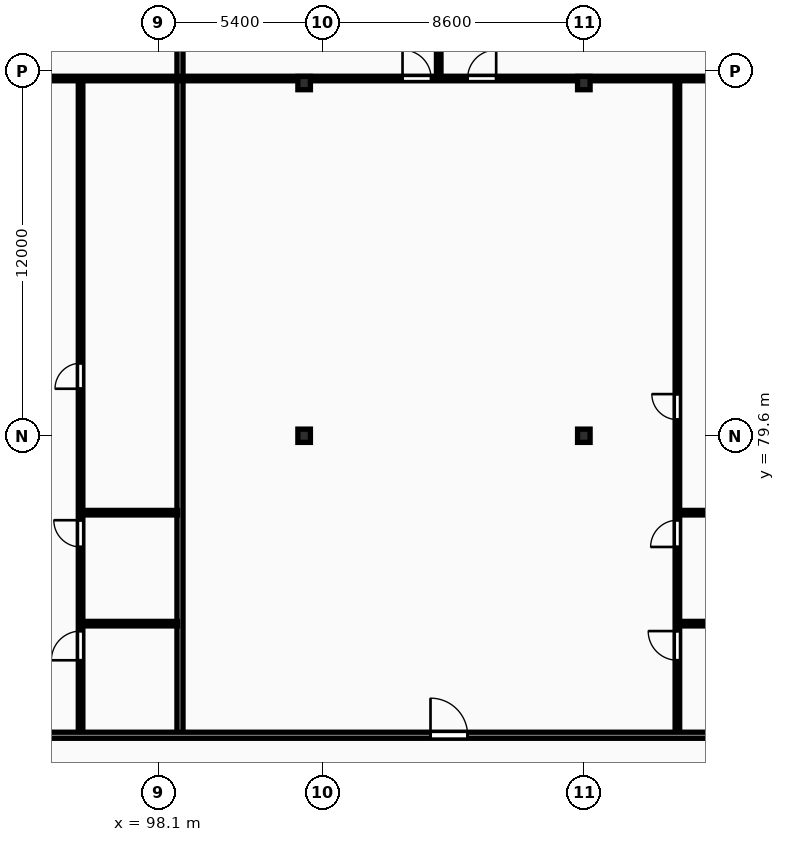
"""IFC4 building model, lengths in metres.
Left out: names, types, materials, properties, quantities, classifications, styles, units other than length and angle.
Written with IfcOpenShell. Run it as: python <this file> out.ifc"""

import sys

from ifc_helpers import new_model, si_unit, direction, frame, frame_2d, origin, origin_2d, place, context, subcontext, project, spatial, rectangle, i_section, extrude, element, fill, save


model = new_model("IFC4")
c1 = context("Model", 3, precision=1e-05, world=origin(), true_north=direction((0.0, 1.0)))
c2 = subcontext(c1, "Body", "Model", "MODEL_VIEW")
j1 = project(units=[si_unit("LENGTHUNIT", "METRE"), si_unit("PLANEANGLEUNIT", "RADIAN")], contexts=[c1])
p1 = place(None, origin())
s1 = spatial("IfcSite", under=j1, at=p1, CompositionType="ELEMENT")
p2 = place(p1, origin())
s2 = spatial("IfcBuilding", under=s1, at=p2, CompositionType="ELEMENT")
p3 = place(p2, frame((0.0, 0.0, 150.1)))
s3 = spatial("IfcBuildingStorey", under=s2, at=p3, CompositionType="ELEMENT", Elevation=150.1)
for number, where, z_axis, x_axis in (
    (1, (102.9, 79.6, 0.0), (0.0, 0.0, 1.0), (1.0, 0.0, 0.0)),
    (2, (102.9, 91.2, 0.0), (0.0, 0.0, 1.0), (1.0, 0.0, 0.0)),
    (3, (112.1, 79.6, 0.0), (0.0, 0.0, 1.0), (1.0, 0.0, 0.0)),
    (4, (112.1, 91.2, 0.0), (0.0, 0.0, 1.0), (1.0, 0.0, 0.0)),
):
    element("IfcColumn", number, at=place(p3, frame(where, z_axis=z_axis, x_axis=x_axis)), inside=s3, PredefinedType="COLUMN", context=c2, shape_type="SweptSolid", body=[
        extrude(i_section(OverallWidth=0.412, OverallDepth=0.437, WebThickness=0.036, FlangeThickness=0.052, FilletRadius=0.015, at=origin_2d()), origin(), (0.0, 0.0, 1.0), 3.6),
    ])
p4 = place(p3, frame((98.816, 69.83, 0.0), z_axis=(0.0, 0.0, 1.0), x_axis=(0.0, 1.0, 0.0)))
e5 = element("IfcWall", 5, at=p4, inside=s3, PredefinedType="PARTITIONING", context=c2, shape_type="SweptSolid", body=[
    extrude(rectangle(XDim=26.07, YDim=0.2, at=frame_2d((13.035, 0.0))), origin(), (0.0, 0.0, 1.0), 3.31),
])
for number, where, z_axis, x_axis in (
    (6, (95.606, 73.42, 0.0), (0.0, 0.0, 1.0), (1.0, 0.0, 0.0)),
    (7, (95.606, 77.07, 0.0), (0.0, 0.0, 1.0), (1.0, 0.0, 0.0)),
):
    element("IfcWall", number, at=place(p3, frame(where, z_axis=z_axis, x_axis=x_axis)), inside=s3, PredefinedType="PARTITIONING", context=c2, shape_type="SweptSolid", body=[
        extrude(rectangle(XDim=3.13, YDim=0.15, at=frame_2d((1.565, 0.0))), origin(), (0.0, 0.0, 1.0), 3.31),
    ])
p5 = place(p3, frame((95.546, 69.81, 0.0), z_axis=(0.0, 0.0, 1.0), x_axis=(0.0, 1.0, 0.0)))
e8 = element("IfcWall", 8, at=p5, inside=s3, PredefinedType="PARTITIONING", context=c2, shape_type="SweptSolid", body=[
    extrude(rectangle(XDim=21.48, YDim=0.15, at=frame_2d((10.74, 0.0))), origin(), (0.0, 0.0, 1.0), 3.31),
])
p6 = place(p5, frame((2.406, 0.0, 0.0)))
e9 = element("IfcOpeningElement", 9, at=p6, cuts=e8, PredefinedType="OPENING", context=c2, shape_type="SweptSolid", body=[
    extrude(rectangle(XDim=0.96, YDim=2.1, at=frame_2d((0.48, 1.05))), frame((0.0, 0.085, 0.0), z_axis=(0.0, -1.0, 0.0), x_axis=(1.0, 0.0, 0.0)), (0.0, 0.0, 1.0), 0.17),
])
p7 = place(p5, frame((6.133, 0.0, 0.0)))
e10 = element("IfcOpeningElement", 10, at=p7, cuts=e8, PredefinedType="OPENING", context=c2, shape_type="SweptSolid", body=[
    extrude(rectangle(XDim=0.88, YDim=2.06, at=frame_2d((0.44, 1.03))), frame((0.0, 0.085, 0.0), z_axis=(0.0, -1.0, 0.0), x_axis=(1.0, 0.0, 0.0)), (0.0, 0.0, 1.0), 0.17),
])
p8 = place(p5, frame((11.336, 0.0, 0.0)))
e11 = element("IfcOpeningElement", 11, at=p8, cuts=e8, PredefinedType="OPENING", context=c2, shape_type="SweptSolid", body=[
    extrude(rectangle(XDim=0.84, YDim=2.04, at=frame_2d((0.42, 1.02))), frame((0.0, 0.085, 0.0), z_axis=(0.0, -1.0, 0.0), x_axis=(1.0, 0.0, 0.0)), (0.0, 0.0, 1.0), 0.17),
])
p9 = place(p3, frame((79.437, 91.35, 0.0), z_axis=(0.0, 0.0, 1.0), x_axis=(1.0, 0.0, 0.0)))
e12 = element("IfcWall", 12, at=p9, inside=s3, PredefinedType="PARTITIONING", context=c2, shape_type="SweptSolid", body=[
    extrude(rectangle(XDim=19.299, YDim=0.15, at=frame_2d((9.649, 0.0))), origin(), (0.0, 0.0, 1.0), 3.003),
])
p10 = place(p9, frame((7.155, 0.0, 0.0)))
e13 = element("IfcOpeningElement", 13, at=p10, cuts=e12, PredefinedType="OPENING", context=c2, shape_type="SweptSolid", body=[
    extrude(rectangle(XDim=0.94, YDim=2.1, at=frame_2d((0.47, 1.05))), frame((0.0, 0.085, 0.0), z_axis=(0.0, -1.0, 0.0), x_axis=(1.0, 0.0, 0.0)), (0.0, 0.0, 1.0), 0.17),
])
p11 = place(p9, frame((9.179, 0.0, 0.0)))
e14 = element("IfcOpeningElement", 14, at=p11, cuts=e12, PredefinedType="OPENING", context=c2, shape_type="SweptSolid", body=[
    extrude(rectangle(XDim=0.94, YDim=2.1, at=frame_2d((0.47, 1.05))), frame((0.0, 0.085, 0.0), z_axis=(0.0, -1.0, 0.0), x_axis=(1.0, 0.0, 0.0)), (0.0, 0.0, 1.0), 0.17),
])
for number, where, z_axis, x_axis in (
    (15, (115.237, 73.42, 0.0), (0.0, 0.0, 1.0), (1.0, 0.0, 0.0)),
    (16, (115.237, 77.07, 0.0), (0.0, 0.0, 1.0), (1.0, 0.0, 0.0)),
):
    element("IfcWall", number, at=place(p3, frame(where, z_axis=z_axis, x_axis=x_axis)), inside=s3, PredefinedType="PARTITIONING", context=c2, shape_type="SweptSolid", body=[
        extrude(rectangle(XDim=3.36, YDim=0.15, at=frame_2d((1.68, 0.0))), origin(), (0.0, 0.0, 1.0), 3.31),
    ])
p12 = place(p3, frame((115.177, 69.81, 0.0), z_axis=(0.0, 0.0, 1.0), x_axis=(0.0, 1.0, 0.0)))
e17 = element("IfcWall", 17, at=p12, inside=s3, PredefinedType="PARTITIONING", context=c2, shape_type="SweptSolid", body=[
    extrude(rectangle(XDim=21.48, YDim=0.15, at=frame_2d((10.74, 0.0))), origin(), (0.0, 0.0, 1.0), 3.31),
])
p13 = place(p12, frame((2.406, 0.0, 0.0)))
e18 = element("IfcOpeningElement", 18, at=p13, cuts=e17, PredefinedType="OPENING", context=c2, shape_type="SweptSolid", body=[
    extrude(rectangle(XDim=0.96, YDim=2.1, at=frame_2d((0.48, 1.05))), frame((0.0, 0.085, 0.0), z_axis=(0.0, -1.0, 0.0), x_axis=(1.0, 0.0, 0.0)), (0.0, 0.0, 1.0), 0.17),
])
p14 = place(p12, frame((6.133, 0.0, 0.0)))
e19 = element("IfcOpeningElement", 19, at=p14, cuts=e17, PredefinedType="OPENING", context=c2, shape_type="SweptSolid", body=[
    extrude(rectangle(XDim=0.88, YDim=2.06, at=frame_2d((0.44, 1.03))), frame((0.0, 0.085, 0.0), z_axis=(0.0, -1.0, 0.0), x_axis=(1.0, 0.0, 0.0)), (0.0, 0.0, 1.0), 0.17),
])
p15 = place(p12, frame((10.32, 0.0, 0.0)))
e20 = element("IfcOpeningElement", 20, at=p15, cuts=e17, PredefinedType="OPENING", context=c2, shape_type="SweptSolid", body=[
    extrude(rectangle(XDim=0.84, YDim=2.04, at=frame_2d((0.42, 1.02))), frame((0.0, 0.085, 0.0), z_axis=(0.0, -1.0, 0.0), x_axis=(1.0, 0.0, 0.0)), (0.0, 0.0, 1.0), 0.17),
])
p16 = place(p3, frame((107.327, 91.43, 0.0), z_axis=(0.0, 0.0, 1.0), x_axis=(0.0, 1.0, 0.0)))
e21 = element("IfcWall", 21, at=p16, inside=s3, PredefinedType="PARTITIONING", context=c2, shape_type="SweptSolid", body=[
    extrude(rectangle(XDim=4.47, YDim=0.15, at=frame_2d((2.235, 0.0))), origin(), (0.0, 0.0, 1.0), 3.31),
])
p17 = place(p3, frame((98.896, 91.35, 0.0), z_axis=(0.0, 0.0, 1.0), x_axis=(1.0, 0.0, 0.0)))
e22 = element("IfcWall", 22, at=p17, inside=s3, PredefinedType="PARTITIONING", context=c2, shape_type="SweptSolid", body=[
    extrude(rectangle(XDim=19.701, YDim=0.15, at=frame_2d((9.851, 0.0))), origin(), (0.0, 0.0, 1.0), 3.003),
])
p18 = place(p17, frame((7.24, 0.0, 0.0)))
e23 = element("IfcOpeningElement", 23, at=p18, cuts=e22, PredefinedType="OPENING", context=c2, shape_type="SweptSolid", body=[
    extrude(rectangle(XDim=0.94, YDim=2.1, at=frame_2d((0.47, 1.05))), frame((0.0, 0.085, 0.0), z_axis=(0.0, -1.0, 0.0), x_axis=(1.0, 0.0, 0.0)), (0.0, 0.0, 1.0), 0.17),
])
p19 = place(p17, frame((9.381, 0.0, 0.0)))
e24 = element("IfcOpeningElement", 24, at=p19, cuts=e22, PredefinedType="OPENING", context=c2, shape_type="SweptSolid", body=[
    extrude(rectangle(XDim=0.94, YDim=2.1, at=frame_2d((0.47, 1.05))), frame((0.0, 0.085, 0.0), z_axis=(0.0, -1.0, 0.0), x_axis=(1.0, 0.0, 0.0)), (0.0, 0.0, 1.0), 0.17),
])
p20 = place(p3, frame((57.6, 69.75, 0.0), z_axis=(0.0, 0.0, 1.0), x_axis=(1.0, 0.0, 0.0)))
e25 = element("IfcWall", 25, at=p20, inside=s3, PredefinedType="PARTITIONING", context=c2, shape_type="SweptSolid", body=[
    extrude(rectangle(XDim=73.0, YDim=0.2, at=frame_2d((36.5, 0.0))), origin(), (0.0, 0.0, 1.0), 3.31),
])
p21 = place(p20, frame((9.189, 0.0, 0.0)))
e26 = element("IfcOpeningElement", 26, at=p21, cuts=e25, PredefinedType="OPENING", context=c2, shape_type="SweptSolid", body=[
    extrude(rectangle(XDim=1.22, YDim=2.18, at=frame_2d((0.61, 1.09))), frame((0.0, 0.11, 0.0), z_axis=(0.0, -1.0, 0.0), x_axis=(1.0, 0.0, 0.0)), (0.0, 0.0, 1.0), 0.22),
])
p22 = place(p20, frame((29.912, 0.0, 0.0)))
e27 = element("IfcOpeningElement", 27, at=p22, cuts=e25, PredefinedType="OPENING", context=c2, shape_type="SweptSolid", body=[
    extrude(rectangle(XDim=1.22, YDim=2.18, at=frame_2d((0.61, 1.09))), frame((0.0, 0.11, 0.0), z_axis=(0.0, -1.0, 0.0), x_axis=(1.0, 0.0, 0.0)), (0.0, 0.0, 1.0), 0.22),
])
p23 = place(p20, frame((49.457, 0.0, 0.0)))
e28 = element("IfcOpeningElement", 28, at=p23, cuts=e25, PredefinedType="OPENING", context=c2, shape_type="SweptSolid", body=[
    extrude(rectangle(XDim=1.22, YDim=2.18, at=frame_2d((0.61, 1.09))), frame((0.0, 0.11, 0.0), z_axis=(0.0, -1.0, 0.0), x_axis=(1.0, 0.0, 0.0)), (0.0, 0.0, 1.0), 0.22),
])
p24 = place(p20, frame((63.122, 0.0, 0.0)))
e29 = element("IfcOpeningElement", 29, at=p24, cuts=e25, PredefinedType="OPENING", context=c2, shape_type="SweptSolid", body=[
    extrude(rectangle(XDim=0.95, YDim=2.15, at=frame_2d((0.475, 1.075))), frame((0.0, 0.11, 0.0), z_axis=(0.0, -1.0, 0.0), x_axis=(1.0, 0.0, 0.0)), (0.0, 0.0, 1.0), 0.22),
])
p25 = place(p6, origin())
e30 = element("IfcDoor", 30, at=p25, inside=s3, OperationType="SINGLE_SWING_LEFT", PredefinedType="DOOR", context=c2, shape_type="SweptSolid", body=[
    extrude(rectangle(XDim=0.96, YDim=2.1, at=frame_2d((0.48, 1.05))), frame((0.0, 0.025, 0.0), z_axis=(0.0, -1.0, 0.0), x_axis=(1.0, 0.0, 0.0)), (0.0, 0.0, 1.0), 0.05),
])
fill(e9, e30)
p26 = place(p7, origin())
e31 = element("IfcDoor", 31, at=p26, inside=s3, OperationType="SINGLE_SWING_RIGHT", PredefinedType="DOOR", context=c2, shape_type="SweptSolid", body=[
    extrude(rectangle(XDim=0.88, YDim=2.06, at=frame_2d((0.44, 1.03))), frame((0.0, 0.025, 0.0), z_axis=(0.0, -1.0, 0.0), x_axis=(1.0, 0.0, 0.0)), (0.0, 0.0, 1.0), 0.05),
])
fill(e10, e31)
p27 = place(p8, origin())
e32 = element("IfcDoor", 32, at=p27, inside=s3, OperationType="SINGLE_SWING_LEFT", PredefinedType="DOOR", context=c2, shape_type="SweptSolid", body=[
    extrude(rectangle(XDim=0.84, YDim=2.04, at=frame_2d((0.42, 1.02))), frame((0.0, 0.025, 0.0), z_axis=(0.0, -1.0, 0.0), x_axis=(1.0, 0.0, 0.0)), (0.0, 0.0, 1.0), 0.05),
])
fill(e11, e32)
p28 = place(p13, origin())
e33 = element("IfcDoor", 33, at=p28, inside=s3, OperationType="SINGLE_SWING_RIGHT", PredefinedType="DOOR", context=c2, shape_type="SweptSolid", body=[
    extrude(rectangle(XDim=0.96, YDim=2.1, at=frame_2d((0.48, 1.05))), frame((0.0, 0.025, 0.0), z_axis=(0.0, -1.0, 0.0), x_axis=(1.0, 0.0, 0.0)), (0.0, 0.0, 1.0), 0.05),
])
fill(e18, e33)
p29 = place(p14, origin())
e34 = element("IfcDoor", 34, at=p29, inside=s3, OperationType="SINGLE_SWING_LEFT", PredefinedType="DOOR", context=c2, shape_type="SweptSolid", body=[
    extrude(rectangle(XDim=0.88, YDim=2.06, at=frame_2d((0.44, 1.03))), frame((0.0, 0.025, 0.0), z_axis=(0.0, -1.0, 0.0), x_axis=(1.0, 0.0, 0.0)), (0.0, 0.0, 1.0), 0.05),
])
fill(e19, e34)
p30 = place(p15, origin())
e35 = element("IfcDoor", 35, at=p30, inside=s3, OperationType="SINGLE_SWING_RIGHT", PredefinedType="DOOR", context=c2, shape_type="SweptSolid", body=[
    extrude(rectangle(XDim=0.84, YDim=2.04, at=frame_2d((0.42, 1.02))), frame((0.0, 0.025, 0.0), z_axis=(0.0, -1.0, 0.0), x_axis=(1.0, 0.0, 0.0)), (0.0, 0.0, 1.0), 0.05),
])
fill(e20, e35)
p31 = place(p18, origin())
e36 = element("IfcDoor", 36, at=p31, inside=s3, OperationType="SINGLE_SWING_LEFT", PredefinedType="DOOR", context=c2, shape_type="SweptSolid", body=[
    extrude(rectangle(XDim=0.94, YDim=2.1, at=frame_2d((0.47, 1.05))), frame((0.0, 0.025, 0.0), z_axis=(0.0, -1.0, 0.0), x_axis=(1.0, 0.0, 0.0)), (0.0, 0.0, 1.0), 0.05),
])
fill(e23, e36)
p32 = place(p19, origin())
e37 = element("IfcDoor", 37, at=p32, inside=s3, OperationType="SINGLE_SWING_RIGHT", PredefinedType="DOOR", context=c2, shape_type="SweptSolid", body=[
    extrude(rectangle(XDim=0.94, YDim=2.1, at=frame_2d((0.47, 1.05))), frame((0.0, 0.025, 0.0), z_axis=(0.0, -1.0, 0.0), x_axis=(1.0, 0.0, 0.0)), (0.0, 0.0, 1.0), 0.05),
])
fill(e24, e37)
p33 = place(p23, origin())
e38 = element("IfcDoor", 38, at=p33, inside=s3, OperationType="SINGLE_SWING_LEFT", PredefinedType="DOOR", context=c2, shape_type="SweptSolid", body=[
    extrude(rectangle(XDim=1.22, YDim=2.18, at=frame_2d((0.61, 1.09))), frame((0.0, 0.025, 0.0), z_axis=(0.0, -1.0, 0.0), x_axis=(1.0, 0.0, 0.0)), (0.0, 0.0, 1.0), 0.05),
])
fill(e28, e38)
save(model, sys.argv[1])
